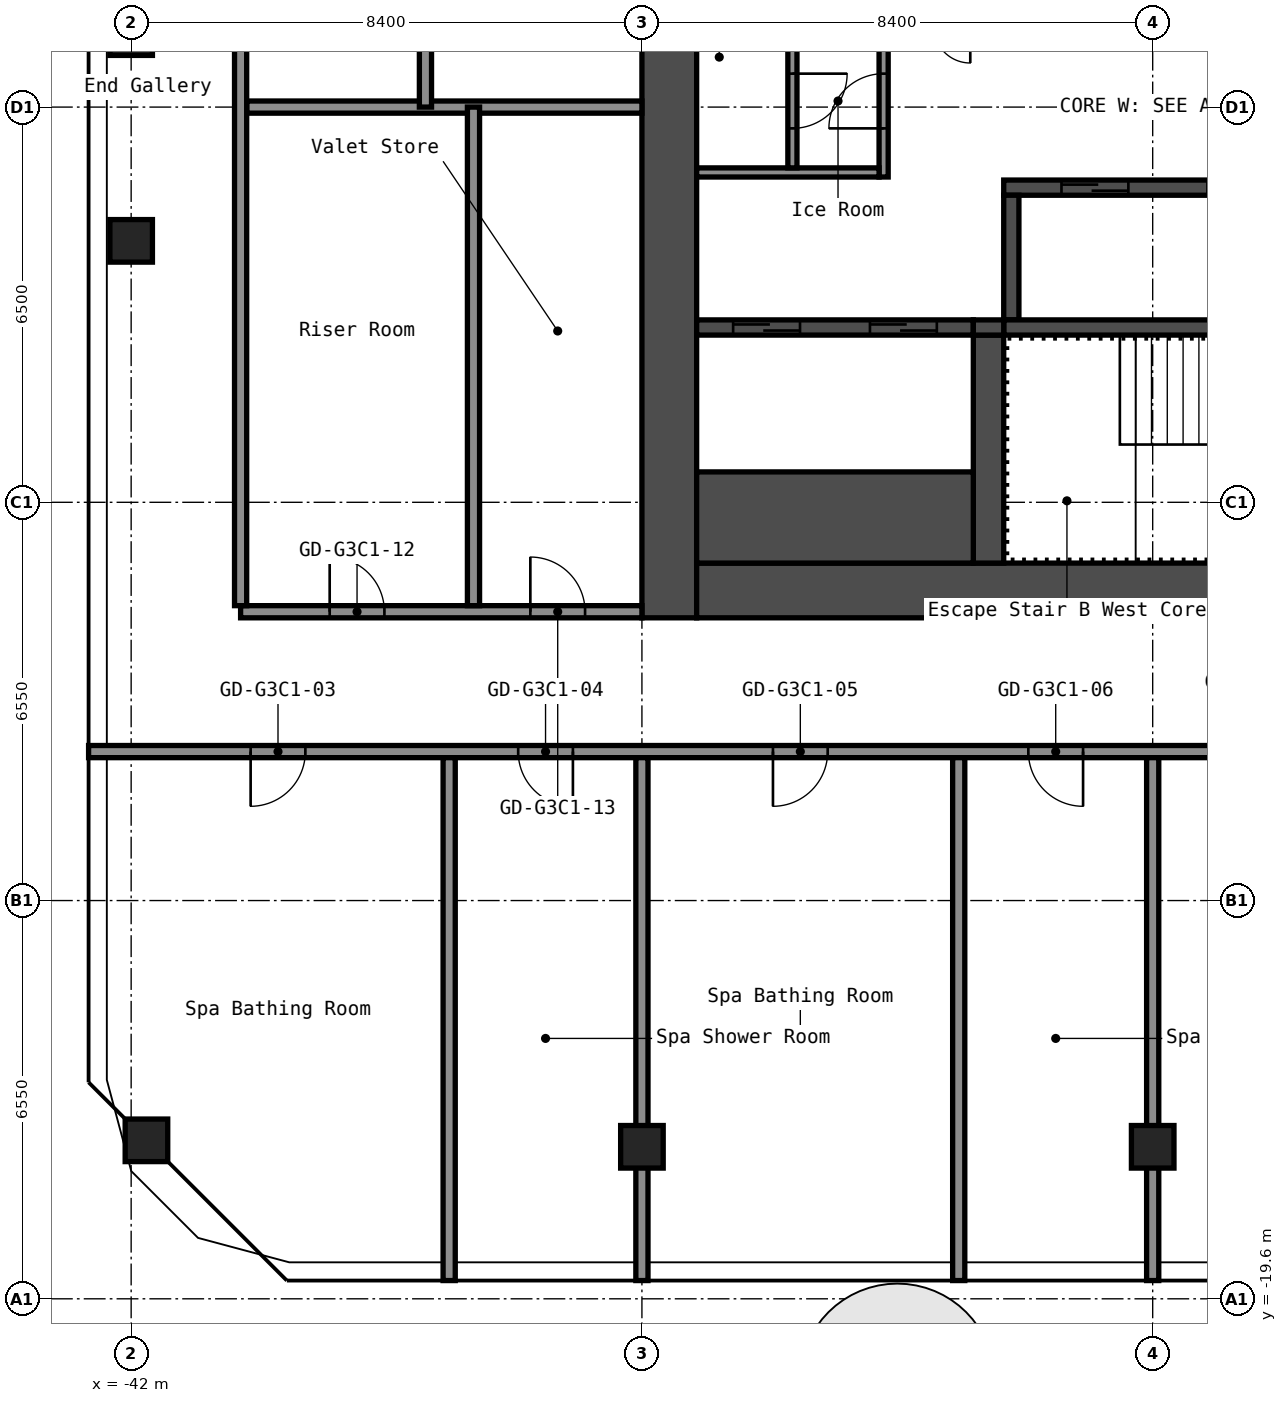
"""IFC4 building model, lengths in metres.
Left out: names, types, materials, properties, quantities, classifications, styles, units other than length and angle.
Written with IfcOpenShell. Run it as: python <this file> out.ifc"""

import sys

from ifc_helpers import new_model, si_unit, direction, frame, frame_2d, origin, origin_2d, place, context, subcontext, project, spatial, rectangle, hollow_rectangle, extrude, element, fill, save


model = new_model("IFC4")
c1 = context("Model", 3, precision=1e-05, world=origin(), true_north=direction((0.0, 1.0)))
c2 = subcontext(c1, "Body", "Model", "MODEL_VIEW")
j1 = project(units=[si_unit("LENGTHUNIT", "METRE"), si_unit("PLANEANGLEUNIT", "RADIAN")], contexts=[c1])
p1 = place(None, origin())
s1 = spatial("IfcSite", under=j1, at=p1, CompositionType="ELEMENT")
p2 = place(p1, origin())
s2 = spatial("IfcBuilding", under=s1, at=p2, CompositionType="ELEMENT")
p3 = place(p2, frame((0.0, 0.0, 153.4)))
s3 = spatial("IfcBuildingStorey", under=s2, at=p3, CompositionType="ELEMENT", Elevation=153.4)
for number, where, z_axis, x_axis in (
    (1, (-41.749, -16.994, 0.0), (0.0, 0.0, 1.0), (1.0, 0.0, 0.0)),
    (2, (-42.0, -2.2, 0.0), (0.0, 0.0, 1.0), (1.0, 0.0, 0.0)),
    (3, (-42.0, 1.2, 0.0), (0.0, 0.0, 1.0), (1.0, 0.0, 0.0)),
    (4, (-33.6, -17.1, 0.0), (0.0, 0.0, 1.0), (1.0, 0.0, 0.0)),
    (5, (-25.2, -17.1, 0.0), (0.0, 0.0, 1.0), (1.0, 0.0, 0.0)),
):
    element("IfcColumn", number, at=place(p3, frame(where, z_axis=z_axis, x_axis=x_axis)), inside=s3, PredefinedType="COLUMN", context=c2, shape_type="SweptSolid", body=[
        extrude(hollow_rectangle(XDim=0.7, YDim=0.7, WallThickness=0.028, at=origin_2d()), origin(), (0.0, 0.0, 1.0), 2.75),
    ])
p4 = place(p3, frame((-33.15, -8.4, 0.0), z_axis=(0.0, 0.0, 1.0), x_axis=(0.0, 1.0, 0.0)))
e6 = element("IfcWall", 6, at=p4, inside=s3, PredefinedType="SHEAR", context=c2, shape_type="SweptSolid", body=[
    extrude(rectangle(XDim=16.8, YDim=0.9, at=frame_2d((8.4, 0.0))), origin(), (0.0, 0.0, 1.0), 2.75),
])
p5 = place(p3, frame((-32.7, -7.95, 0.0), z_axis=(0.0, 0.0, 1.0), x_axis=(1.0, 0.0, 0.0)))
e7 = element("IfcWall", 7, at=p5, inside=s3, PredefinedType="SHEAR", context=c2, shape_type="SweptSolid", body=[
    extrude(rectangle(XDim=15.0, YDim=0.9, at=frame_2d((7.5, 0.0))), origin(), (0.0, 0.0, 1.0), 2.75),
])
p6 = place(p5, frame((11.45, 0.0, 0.0)))
e8 = element("IfcOpeningElement", 8, at=p6, cuts=e7, PredefinedType="OPENING", context=c2, shape_type="SweptSolid", body=[
    extrude(rectangle(XDim=1.0, YDim=2.1, at=frame_2d((0.5, 1.05))), frame((0.0, 0.46, 0.0), z_axis=(0.0, -1.0, 0.0), x_axis=(1.0, 0.0, 0.0)), (0.0, 0.0, 1.0), 0.92),
])
p7 = place(p3, frame((-27.65, -1.325, 0.0), z_axis=(0.0, 0.0, 1.0), x_axis=(1.0, 0.0, 0.0)))
e9 = element("IfcWall", 9, at=p7, inside=s3, PredefinedType="SHEAR", context=c2, shape_type="SweptSolid", body=[
    extrude(rectangle(XDim=7.5, YDim=0.25, at=frame_2d((3.75, 0.0))), origin(), (0.0, 0.0, 1.0), 2.75),
])
p8 = place(p7, frame((5.75, 0.0, 0.0)))
e10 = element("IfcOpeningElement", 10, at=p8, cuts=e9, PredefinedType="OPENING", context=c2, shape_type="SweptSolid", body=[
    extrude(rectangle(XDim=1.1, YDim=2.1, at=frame_2d((0.55, 1.05))), frame((0.0, 0.135, 0.0), z_axis=(0.0, -1.0, 0.0), x_axis=(1.0, 0.0, 0.0)), (0.0, 0.0, 1.0), 0.27),
])
p9 = place(p7, frame((3.35, 0.0, 0.0)))
e11 = element("IfcOpeningElement", 11, at=p9, cuts=e9, PredefinedType="OPENING", context=c2, shape_type="SweptSolid", body=[
    extrude(rectangle(XDim=1.1, YDim=2.1, at=frame_2d((0.55, 1.05))), frame((0.0, 0.135, 0.0), z_axis=(0.0, -1.0, 0.0), x_axis=(1.0, 0.0, 0.0)), (0.0, 0.0, 1.0), 0.27),
])
p10 = place(p7, frame((0.95, 0.0, 0.0)))
e12 = element("IfcOpeningElement", 12, at=p10, cuts=e9, PredefinedType="OPENING", context=c2, shape_type="SweptSolid", body=[
    extrude(rectangle(XDim=1.1, YDim=2.1, at=frame_2d((0.55, 1.05))), frame((0.0, 0.135, 0.0), z_axis=(0.0, -1.0, 0.0), x_axis=(1.0, 0.0, 0.0)), (0.0, 0.0, 1.0), 0.27),
])
p11 = place(p3, frame((-27.525, -3.5, 0.0), z_axis=(0.0, 0.0, 1.0), x_axis=(0.0, 1.0, 0.0)))
e13 = element("IfcWall", 13, at=p11, inside=s3, PredefinedType="SHEAR", context=c2, shape_type="SweptSolid", body=[
    extrude(rectangle(XDim=2.05, YDim=0.25, at=frame_2d((1.025, 0.0))), origin(), (0.0, 0.0, 1.0), 2.75),
])
p12 = place(p3, frame((-27.65, -3.625, 0.0), z_axis=(0.0, 0.0, 1.0), x_axis=(1.0, 0.0, 0.0)))
e14 = element("IfcWall", 14, at=p12, inside=s3, PredefinedType="SHEAR", context=c2, shape_type="SweptSolid", body=[
    extrude(rectangle(XDim=7.5, YDim=0.25, at=frame_2d((3.75, 0.0))), origin(), (0.0, 0.0, 1.0), 2.75),
])
p13 = place(p3, frame((-27.9, -7.5, 0.0), z_axis=(0.0, 0.0, 1.0), x_axis=(0.0, 1.0, 0.0)))
e15 = element("IfcWall", 15, at=p13, inside=s3, PredefinedType="SHEAR", context=c2, shape_type="SweptSolid", body=[
    extrude(rectangle(XDim=3.75, YDim=0.5, at=frame_2d((1.875, 0.0))), origin(), (0.0, 0.0, 1.0), 2.75),
])
p14 = place(p3, frame((-32.7, -3.625, 0.0), z_axis=(0.0, 0.0, 1.0), x_axis=(1.0, 0.0, 0.0)))
e16 = element("IfcWall", 16, at=p14, inside=s3, PredefinedType="SHEAR", context=c2, shape_type="SweptSolid", body=[
    extrude(rectangle(XDim=4.55, YDim=0.25, at=frame_2d((2.275, 0.0))), origin(), (0.0, 0.0, 1.0), 2.75),
])
p15 = place(p14, frame((2.85, 0.0, 0.0)))
e17 = element("IfcOpeningElement", 17, at=p15, cuts=e16, PredefinedType="OPENING", context=c2, shape_type="SweptSolid", body=[
    extrude(rectangle(XDim=1.1, YDim=2.1, at=frame_2d((0.55, 1.05))), frame((0.0, 0.135, 0.0), z_axis=(0.0, -1.0, 0.0), x_axis=(1.0, 0.0, 0.0)), (0.0, 0.0, 1.0), 0.27),
])
p16 = place(p14, frame((0.6, 0.0, 0.0)))
e18 = element("IfcOpeningElement", 18, at=p16, cuts=e16, PredefinedType="OPENING", context=c2, shape_type="SweptSolid", body=[
    extrude(rectangle(XDim=1.1, YDim=2.1, at=frame_2d((0.55, 1.05))), frame((0.0, 0.135, 0.0), z_axis=(0.0, -1.0, 0.0), x_axis=(1.0, 0.0, 0.0)), (0.0, 0.0, 1.0), 0.27),
])
p17 = place(p3, frame((-32.7, -6.75, 0.0), z_axis=(0.0, 0.0, 1.0), x_axis=(1.0, 0.0, 0.0)))
e19 = element("IfcWall", 19, at=p17, inside=s3, PredefinedType="SHEAR", context=c2, shape_type="SweptSolid", body=[
    extrude(rectangle(XDim=4.55, YDim=1.5, at=frame_2d((2.275, 0.0))), origin(), (0.0, 0.0, 1.0), 2.75),
])
p18 = place(p3, frame((-28.15, -3.625, 0.0), z_axis=(0.0, 0.0, 1.0), x_axis=(1.0, 0.0, 0.0)))
e20 = element("IfcWall", 20, at=p18, inside=s3, PredefinedType="SHEAR", context=c2, shape_type="SweptSolid", body=[
    extrude(rectangle(XDim=0.5, YDim=0.25, at=frame_2d((0.25, 0.0))), origin(), (0.0, 0.0, 1.0), 2.75),
])
p19 = place(p3, frame((-29.625, -1.15, 0.0), z_axis=(0.0, 0.0, 1.0), x_axis=(0.0, 1.0, 0.0)))
e21 = element("IfcWall", 21, at=p19, inside=s3, PredefinedType="PARTITIONING", context=c2, shape_type="SweptSolid", body=[
    extrude(rectangle(XDim=2.35, YDim=0.15, at=frame_2d((1.175, 0.0))), origin(), (0.0, 0.0, 1.0), 2.75),
])
p20 = place(p19, frame((0.8, 0.0, 0.0)))
e22 = element("IfcOpeningElement", 22, at=p20, cuts=e21, PredefinedType="OPENING", context=c2, shape_type="SweptSolid", body=[
    extrude(rectangle(XDim=0.9, YDim=2.1, at=frame_2d((0.45, 1.05))), frame((0.0, 0.085, 0.0), z_axis=(0.0, -1.0, 0.0), x_axis=(1.0, 0.0, 0.0)), (0.0, 0.0, 1.0), 0.17),
])
p21 = place(p3, frame((-32.7, -1.075, 0.0), z_axis=(0.0, 0.0, 1.0), x_axis=(1.0, 0.0, 0.0)))
e23 = element("IfcWall", 23, at=p21, inside=s3, PredefinedType="PARTITIONING", context=c2, shape_type="SweptSolid", body=[
    extrude(rectangle(XDim=3.0, YDim=0.15, at=frame_2d((1.5, 0.0))), origin(), (0.0, 0.0, 1.0), 2.75),
])
p22 = place(p3, frame((-31.125, -1.0, 0.0), z_axis=(0.0, 0.0, 1.0), x_axis=(0.0, 1.0, 0.0)))
e24 = element("IfcWall", 24, at=p22, inside=s3, PredefinedType="PARTITIONING", context=c2, shape_type="SweptSolid", body=[
    extrude(rectangle(XDim=2.2, YDim=0.15, at=frame_2d((1.1, 0.0))), origin(), (0.0, 0.0, 1.0), 2.75),
])
p23 = place(p22, frame((0.65, 0.0, 0.0)))
e25 = element("IfcOpeningElement", 25, at=p23, cuts=e24, PredefinedType="OPENING", context=c2, shape_type="SweptSolid", body=[
    extrude(rectangle(XDim=0.9, YDim=2.1, at=frame_2d((0.45, 1.05))), frame((0.0, 0.085, 0.0), z_axis=(0.0, -1.0, 0.0), x_axis=(1.0, 0.0, 0.0)), (0.0, 0.0, 1.0), 0.17),
])
p24 = place(p3, frame((-42.7, -10.6, 0.0), z_axis=(0.0, 0.0, 1.0), x_axis=(1.0, 0.0, 0.0)))
e26 = element("IfcWall", 26, at=p24, inside=s3, PredefinedType="PARTITIONING", context=c2, shape_type="SweptSolid", body=[
    extrude(rectangle(XDim=25.9, YDim=0.2, at=frame_2d((12.95, 0.0))), origin(), (0.0, 0.0, 1.0), 2.75),
])
p25 = place(p24, frame((2.665, 0.0, 0.0)))
e27 = element("IfcOpeningElement", 27, at=p25, cuts=e26, PredefinedType="OPENING", context=c2, shape_type="SweptSolid", body=[
    extrude(rectangle(XDim=0.9, YDim=2.1, at=frame_2d((0.45, 1.05))), frame((0.0, 0.11, 0.0), z_axis=(0.0, -1.0, 0.0), x_axis=(1.0, 0.0, 0.0)), (0.0, 0.0, 1.0), 0.22),
])
p26 = place(p24, frame((7.065, 0.0, 0.0)))
e28 = element("IfcOpeningElement", 28, at=p26, cuts=e26, PredefinedType="OPENING", context=c2, shape_type="SweptSolid", body=[
    extrude(rectangle(XDim=0.9, YDim=2.1, at=frame_2d((0.45, 1.05))), frame((0.0, 0.11, 0.0), z_axis=(0.0, -1.0, 0.0), x_axis=(1.0, 0.0, 0.0)), (0.0, 0.0, 1.0), 0.22),
])
p27 = place(p24, frame((11.255, 0.0, 0.0)))
e29 = element("IfcOpeningElement", 29, at=p27, cuts=e26, PredefinedType="OPENING", context=c2, shape_type="SweptSolid", body=[
    extrude(rectangle(XDim=0.9, YDim=2.1, at=frame_2d((0.45, 1.05))), frame((0.0, 0.11, 0.0), z_axis=(0.0, -1.0, 0.0), x_axis=(1.0, 0.0, 0.0)), (0.0, 0.0, 1.0), 0.22),
])
p28 = place(p24, frame((15.455, 0.0, 0.0)))
e30 = element("IfcOpeningElement", 30, at=p28, cuts=e26, PredefinedType="OPENING", context=c2, shape_type="SweptSolid", body=[
    extrude(rectangle(XDim=0.9, YDim=2.1, at=frame_2d((0.45, 1.05))), frame((0.0, 0.11, 0.0), z_axis=(0.0, -1.0, 0.0), x_axis=(1.0, 0.0, 0.0)), (0.0, 0.0, 1.0), 0.22),
])
p29 = place(p24, frame((21.2, 0.0, 0.0)))
e31 = element("IfcOpeningElement", 31, at=p29, cuts=e26, PredefinedType="OPENING", context=c2, shape_type="SweptSolid", body=[
    extrude(rectangle(XDim=1.0, YDim=2.1, at=frame_2d((0.5, 1.05))), frame((0.0, 0.11, 0.0), z_axis=(0.0, -1.0, 0.0), x_axis=(1.0, 0.0, 0.0)), (0.0, 0.0, 1.0), 0.22),
])
p30 = place(p3, frame((-40.2, -8.3, 0.0), z_axis=(0.0, 0.0, 1.0), x_axis=(1.0, 0.0, 0.0)))
e32 = element("IfcWall", 32, at=p30, inside=s3, PredefinedType="PARTITIONING", context=c2, shape_type="SweptSolid", body=[
    extrude(rectangle(XDim=6.6, YDim=0.2, at=frame_2d((3.3, 0.0))), origin(), (0.0, 0.0, 1.0), 2.75),
])
p31 = place(p30, frame((1.465, 0.0, 0.0)))
e33 = element("IfcOpeningElement", 33, at=p31, cuts=e32, PredefinedType="OPENING", context=c2, shape_type="SweptSolid", body=[
    extrude(rectangle(XDim=0.9, YDim=2.1, at=frame_2d((0.45, 1.05))), frame((0.0, 0.11, 0.0), z_axis=(0.0, -1.0, 0.0), x_axis=(1.0, 0.0, 0.0)), (0.0, 0.0, 1.0), 0.22),
])
p32 = place(p30, frame((4.765, 0.0, 0.0)))
e34 = element("IfcOpeningElement", 34, at=p32, cuts=e32, PredefinedType="OPENING", context=c2, shape_type="SweptSolid", body=[
    extrude(rectangle(XDim=0.9, YDim=2.1, at=frame_2d((0.45, 1.05))), frame((0.0, 0.11, 0.0), z_axis=(0.0, -1.0, 0.0), x_axis=(1.0, 0.0, 0.0)), (0.0, 0.0, 1.0), 0.22),
])
p33 = place(p3, frame((-40.1, 0.0, 0.0), z_axis=(0.0, 0.0, 1.0), x_axis=(1.0, 0.0, 0.0)))
e35 = element("IfcWall", 35, at=p33, inside=s3, PredefinedType="PARTITIONING", context=c2, shape_type="SweptSolid", body=[
    extrude(rectangle(XDim=6.5, YDim=0.2, at=frame_2d((3.25, 0.0))), origin(), (0.0, 0.0, 1.0), 2.75),
])
p34 = place(p3, frame((-40.2, -8.2, 0.0), z_axis=(0.0, 0.0, 1.0), x_axis=(0.0, 1.0, 0.0)))
e36 = element("IfcWall", 36, at=p34, inside=s3, PredefinedType="PARTITIONING", context=c2, shape_type="SweptSolid", body=[
    extrude(rectangle(XDim=16.4, YDim=0.2, at=frame_2d((8.2, 0.0))), origin(), (0.0, 0.0, 1.0), 2.75),
])
p35 = place(p3, frame((-37.16, 0.0, 0.0), z_axis=(0.0, 0.0, 1.0), x_axis=(0.0, 1.0, 0.0)))
e37 = element("IfcWall", 37, at=p35, inside=s3, PredefinedType="PARTITIONING", context=c2, shape_type="SweptSolid", body=[
    extrude(rectangle(XDim=8.2, YDim=0.2, at=frame_2d((4.1, 0.0))), origin(), (0.0, 0.0, 1.0), 2.75),
])
p36 = place(p3, frame((-36.77, -19.3, 0.0), z_axis=(0.0, 0.0, 1.0), x_axis=(0.0, 1.0, 0.0)))
e38 = element("IfcWall", 38, at=p36, inside=s3, PredefinedType="PARTITIONING", context=c2, shape_type="SweptSolid", body=[
    extrude(rectangle(XDim=8.6, YDim=0.2, at=frame_2d((4.3, 0.0))), origin(), (0.0, 0.0, 1.0), 2.75),
])
p37 = place(p3, frame((-36.37, -8.2, 0.0), z_axis=(0.0, 0.0, 1.0), x_axis=(0.0, 1.0, 0.0)))
e39 = element("IfcWall", 39, at=p37, inside=s3, PredefinedType="PARTITIONING", context=c2, shape_type="SweptSolid", body=[
    extrude(rectangle(XDim=8.2, YDim=0.2, at=frame_2d((4.1, 0.0))), origin(), (0.0, 0.0, 1.0), 2.75),
])
for number, where, z_axis, x_axis in (
    (40, (-33.6, -19.3, 0.0), (0.0, 0.0, 1.0), (0.0, 1.0, 0.0)),
    (41, (-28.39, -19.3, 0.0), (0.0, 0.0, 1.0), (0.0, 1.0, 0.0)),
    (42, (-25.2, -19.3, 0.0), (0.0, 0.0, 1.0), (0.0, 1.0, 0.0)),
):
    element("IfcWall", number, at=place(p3, frame(where, z_axis=z_axis, x_axis=x_axis)), inside=s3, PredefinedType="PARTITIONING", context=c2, shape_type="SweptSolid", body=[
        extrude(rectangle(XDim=8.6, YDim=0.2, at=frame_2d((4.3, 0.0))), origin(), (0.0, 0.0, 1.0), 2.75),
    ])
p38 = place(p20, origin())
e43 = element("IfcDoor", 43, at=p38, inside=s3, OperationType="SINGLE_SWING_RIGHT", PredefinedType="DOOR", context=c2, shape_type="SweptSolid", body=[
    extrude(rectangle(XDim=0.9, YDim=2.1, at=frame_2d((0.45, 1.05))), frame((0.0, 0.025, 0.0), z_axis=(0.0, -1.0, 0.0), x_axis=(1.0, 0.0, 0.0)), (0.0, 0.0, 1.0), 0.05),
])
fill(e22, e43)
p39 = place(p23, origin())
e44 = element("IfcDoor", 44, at=p39, inside=s3, OperationType="SINGLE_SWING_RIGHT", PredefinedType="DOOR", context=c2, shape_type="SweptSolid", body=[
    extrude(rectangle(XDim=0.9, YDim=2.1, at=frame_2d((0.45, 1.05))), frame((0.0, 0.025, 0.0), z_axis=(0.0, -1.0, 0.0), x_axis=(1.0, 0.0, 0.0)), (0.0, 0.0, 1.0), 0.05),
])
fill(e25, e44)
p40 = place(p10, origin())
e45 = element("IfcDoor", 45, at=p40, inside=s3, OperationType="DOUBLE_DOOR_SLIDING", PredefinedType="DOOR", context=c2, shape_type="SweptSolid", body=[
    extrude(rectangle(XDim=1.1, YDim=2.1, at=frame_2d((0.55, 1.05))), frame((0.0, 0.025, 0.0), z_axis=(0.0, -1.0, 0.0), x_axis=(1.0, 0.0, 0.0)), (0.0, 0.0, 1.0), 0.05),
])
fill(e12, e45)
p41 = place(p15, origin())
e46 = element("IfcDoor", 46, at=p41, inside=s3, OperationType="DOUBLE_DOOR_SLIDING", PredefinedType="DOOR", context=c2, shape_type="SweptSolid", body=[
    extrude(rectangle(XDim=1.1, YDim=2.1, at=frame_2d((0.55, 1.05))), frame((0.0, 0.025, 0.0), z_axis=(0.0, -1.0, 0.0), x_axis=(1.0, 0.0, 0.0)), (0.0, 0.0, 1.0), 0.05),
])
fill(e17, e46)
p42 = place(p16, origin())
e47 = element("IfcDoor", 47, at=p42, inside=s3, OperationType="DOUBLE_DOOR_SLIDING", PredefinedType="DOOR", context=c2, shape_type="SweptSolid", body=[
    extrude(rectangle(XDim=1.1, YDim=2.1, at=frame_2d((0.55, 1.05))), frame((0.0, 0.025, 0.0), z_axis=(0.0, -1.0, 0.0), x_axis=(1.0, 0.0, 0.0)), (0.0, 0.0, 1.0), 0.05),
])
fill(e18, e47)
p43 = place(p25, origin())
e48 = element("IfcDoor", 48, at=p43, inside=s3, OperationType="SINGLE_SWING_LEFT", PredefinedType="DOOR", context=c2, shape_type="SweptSolid", body=[
    extrude(rectangle(XDim=0.9, YDim=2.1, at=frame_2d((0.45, 1.05))), frame((0.0, 0.025, 0.0), z_axis=(0.0, -1.0, 0.0), x_axis=(1.0, 0.0, 0.0)), (0.0, 0.0, 1.0), 0.05),
])
fill(e27, e48)
p44 = place(p26, origin())
e49 = element("IfcDoor", 49, at=p44, inside=s3, OperationType="SINGLE_SWING_RIGHT", PredefinedType="DOOR", context=c2, shape_type="SweptSolid", body=[
    extrude(rectangle(XDim=0.9, YDim=2.1, at=frame_2d((0.45, 1.05))), frame((0.0, 0.025, 0.0), z_axis=(0.0, -1.0, 0.0), x_axis=(1.0, 0.0, 0.0)), (0.0, 0.0, 1.0), 0.05),
])
fill(e28, e49)
p45 = place(p27, origin())
e50 = element("IfcDoor", 50, at=p45, inside=s3, OperationType="SINGLE_SWING_LEFT", PredefinedType="DOOR", context=c2, shape_type="SweptSolid", body=[
    extrude(rectangle(XDim=0.9, YDim=2.1, at=frame_2d((0.45, 1.05))), frame((0.0, 0.025, 0.0), z_axis=(0.0, -1.0, 0.0), x_axis=(1.0, 0.0, 0.0)), (0.0, 0.0, 1.0), 0.05),
])
fill(e29, e50)
p46 = place(p28, origin())
e51 = element("IfcDoor", 51, at=p46, inside=s3, OperationType="SINGLE_SWING_RIGHT", PredefinedType="DOOR", context=c2, shape_type="SweptSolid", body=[
    extrude(rectangle(XDim=0.9, YDim=2.1, at=frame_2d((0.45, 1.05))), frame((0.0, 0.025, 0.0), z_axis=(0.0, -1.0, 0.0), x_axis=(1.0, 0.0, 0.0)), (0.0, 0.0, 1.0), 0.05),
])
fill(e30, e51)
p47 = place(p31, origin())
e52 = element("IfcDoor", 52, at=p47, inside=s3, OperationType="SINGLE_SWING_RIGHT", PredefinedType="DOOR", context=c2, shape_type="SweptSolid", body=[
    extrude(rectangle(XDim=0.9, YDim=2.1, at=frame_2d((0.45, 1.05))), frame((0.0, 0.025, 0.0), z_axis=(0.0, -1.0, 0.0), x_axis=(1.0, 0.0, 0.0)), (0.0, 0.0, 1.0), 0.05),
])
fill(e33, e52)
p48 = place(p32, origin())
e53 = element("IfcDoor", 53, at=p48, inside=s3, OperationType="SINGLE_SWING_RIGHT", PredefinedType="DOOR", context=c2, shape_type="SweptSolid", body=[
    extrude(rectangle(XDim=0.9, YDim=2.1, at=frame_2d((0.45, 1.05))), frame((0.0, 0.025, 0.0), z_axis=(0.0, -1.0, 0.0), x_axis=(1.0, 0.0, 0.0)), (0.0, 0.0, 1.0), 0.05),
])
fill(e34, e53)
save(model, sys.argv[1])
